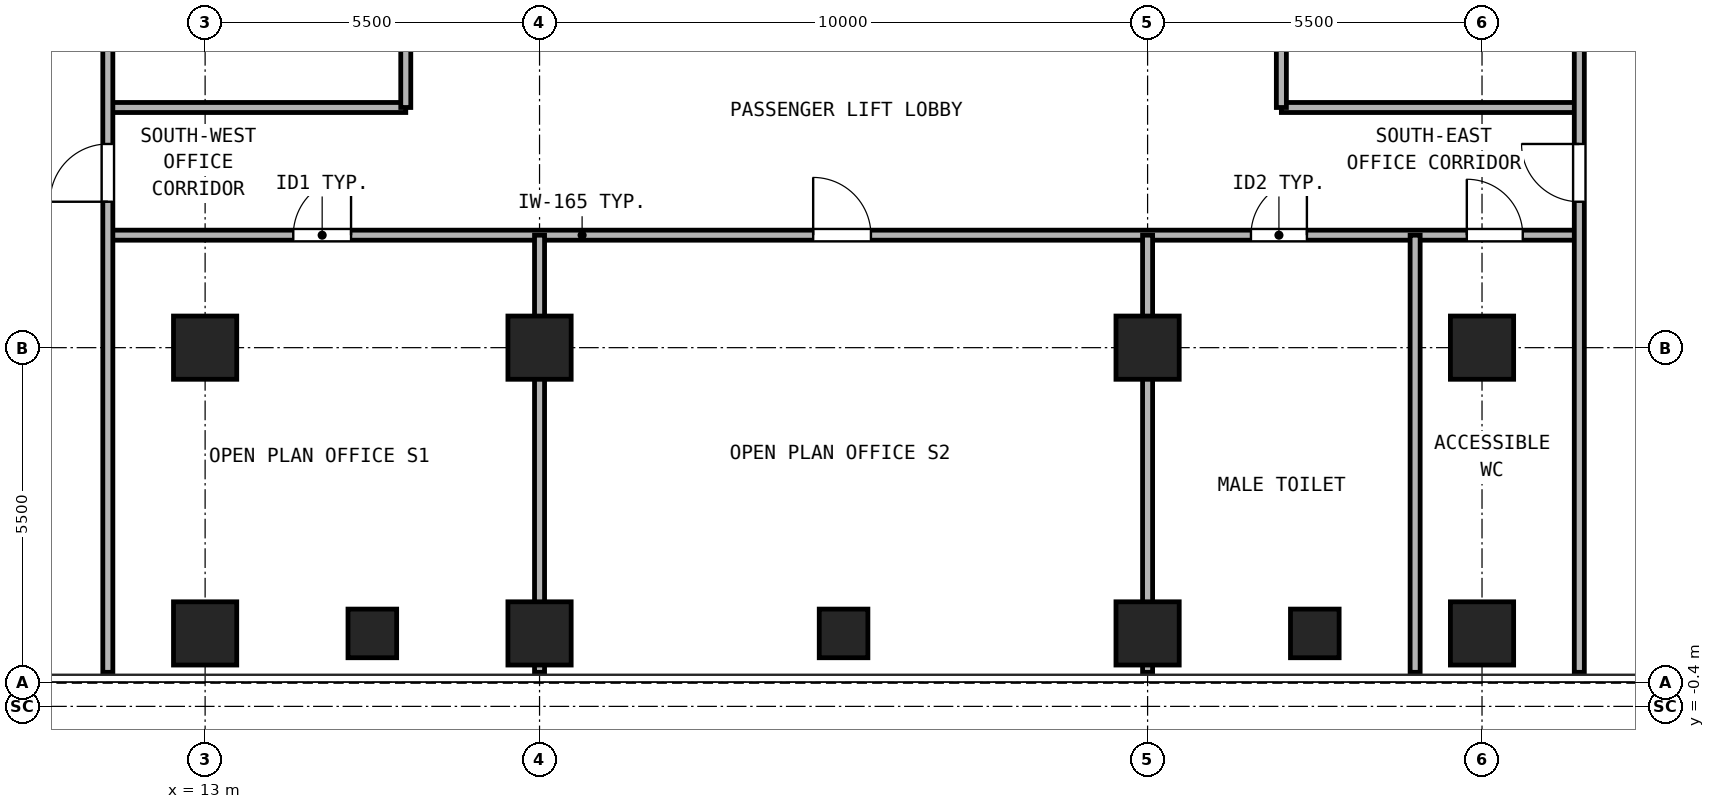
"""IFC4 building model, lengths in metres.
Left out: names, types, materials, properties, quantities, classifications, styles, units other than length and angle.
Written with IfcOpenShell. Run it as: python <this file> out.ifc"""

import sys

from ifc_helpers import new_model, si_unit, direction, frame, frame_2d, origin, origin_2d, place, context, subcontext, project, spatial, rectangle, hollow_rectangle, extrude, source, transform, mapped, element, fill, save


model = new_model("IFC4")
c1 = context("Model", 3, precision=1e-05, world=origin(), true_north=direction((0.0, 1.0)))
c2 = subcontext(c1, "Body", "Model", "MODEL_VIEW")
j1 = project(units=[si_unit("LENGTHUNIT", "METRE"), si_unit("PLANEANGLEUNIT", "RADIAN")], contexts=[c1])
p1 = place(None, origin())
s1 = spatial("IfcSite", under=j1, at=p1, CompositionType="ELEMENT")
p2 = place(p1, origin())
s2 = spatial("IfcBuilding", under=s1, at=p2, CompositionType="ELEMENT")
p3 = place(p2, frame((0.0, 0.0, 29.7)))
s3 = spatial("IfcBuildingStorey", under=s2, at=p3, CompositionType="ELEMENT", Elevation=29.7)
m1 = source(origin(), c2, "Body", "SweptSolid", [
    extrude(hollow_rectangle(XDim=1.04, YDim=1.04, WallThickness=0.065, at=origin_2d()), origin(), (0.0, 0.0, 1.0), 3.32),
])
for number, where, z_axis, x_axis in (
    (1, (13.0, 0.8, 0.0), (0.0, 0.0, 1.0), (1.0, 0.0, 0.0)),
    (2, (18.5, 0.8, 0.0), (0.0, 0.0, 1.0), (1.0, 0.0, 0.0)),
    (3, (28.5, 0.8, 0.0), (0.0, 0.0, 1.0), (1.0, 0.0, 0.0)),
    (4, (34.0, 0.8, 0.0), (0.0, 0.0, 1.0), (1.0, 0.0, 0.0)),
    (5, (13.0, 5.5, 0.0), (0.0, 0.0, 1.0), (1.0, 0.0, 0.0)),
    (6, (18.5, 5.5, 0.0), (0.0, 0.0, 1.0), (1.0, 0.0, 0.0)),
    (7, (28.5, 5.5, 0.0), (0.0, 0.0, 1.0), (1.0, 0.0, 0.0)),
    (8, (34.0, 5.5, 0.0), (0.0, 0.0, 1.0), (1.0, 0.0, 0.0)),
):
    element("IfcColumn", number, at=place(p3, frame(where, z_axis=z_axis, x_axis=x_axis)), inside=s3, PredefinedType="COLUMN", context=c2, shape_type="MappedRepresentation", body=[
        mapped(m1, transform((0.0, 0.0, 0.0), x_axis=(1.0, 0.0, 0.0), y_axis=(0.0, 1.0, 0.0), z_axis=(0.0, 0.0, 1.0), scale=1.0)),
    ])
m2 = source(origin(), c2, "Body", "SweptSolid", [
    extrude(hollow_rectangle(XDim=0.8, YDim=0.8, WallThickness=0.045, at=origin_2d()), origin(), (0.0, 0.0, 1.0), 3.32),
])
for number, where, z_axis, x_axis in (
    (9, (15.75, 0.8, 0.0), (0.0, 0.0, 1.0), (1.0, 0.0, 0.0)),
    (10, (23.5, 0.8, 0.0), (0.0, 0.0, 1.0), (1.0, 0.0, 0.0)),
    (11, (31.25, 0.8, 0.0), (0.0, 0.0, 1.0), (1.0, 0.0, 0.0)),
):
    element("IfcColumn", number, at=place(p3, frame(where, z_axis=z_axis, x_axis=x_axis)), inside=s3, PredefinedType="COLUMN", context=c2, shape_type="MappedRepresentation", body=[
        mapped(m2, transform((0.0, 0.0, 0.0), x_axis=(1.0, 0.0, 0.0), y_axis=(0.0, 1.0, 0.0), z_axis=(0.0, 0.0, 1.0), scale=1.0)),
    ])
p4 = place(p3, frame((11.4, 7.35, 0.0), z_axis=(0.0, 0.0, 1.0), x_axis=(1.0, 0.0, 0.0)))
e12 = element("IfcWall", 12, at=p4, inside=s3, PredefinedType="PARTITIONING", context=c2, shape_type="SweptSolid", body=[
    extrude(rectangle(XDim=24.2, YDim=0.165, at=frame_2d((12.1, 0.0))), origin(), (0.0, 0.0, 1.0), 3.32),
])
p5 = place(p4, frame((3.05, 0.0, 0.0)))
e13 = element("IfcOpeningElement", 13, at=p5, cuts=e12, PredefinedType="OPENING", context=c2, shape_type="SweptSolid", body=[
    extrude(rectangle(XDim=0.95, YDim=2.15, at=frame_2d((0.475, 1.075))), frame((0.0, 0.093, 0.0), z_axis=(0.0, -1.0, 0.0), x_axis=(1.0, 0.0, 0.0)), (0.0, 0.0, 1.0), 0.185),
])
p6 = place(p4, frame((11.6, 0.0, 0.0)))
e14 = element("IfcOpeningElement", 14, at=p6, cuts=e12, PredefinedType="OPENING", context=c2, shape_type="SweptSolid", body=[
    extrude(rectangle(XDim=0.95, YDim=2.15, at=frame_2d((0.475, 1.075))), frame((0.0, 0.093, 0.0), z_axis=(0.0, -1.0, 0.0), x_axis=(1.0, 0.0, 0.0)), (0.0, 0.0, 1.0), 0.185),
])
p7 = place(p4, frame((18.8, 0.0, 0.0)))
e15 = element("IfcOpeningElement", 15, at=p7, cuts=e12, PredefinedType="OPENING", context=c2, shape_type="SweptSolid", body=[
    extrude(rectangle(XDim=0.92, YDim=2.1, at=frame_2d((0.46, 1.05))), frame((0.0, 0.093, 0.0), z_axis=(0.0, -1.0, 0.0), x_axis=(1.0, 0.0, 0.0)), (0.0, 0.0, 1.0), 0.185),
])
p8 = place(p4, frame((22.35, 0.0, 0.0)))
e16 = element("IfcOpeningElement", 16, at=p8, cuts=e12, PredefinedType="OPENING", context=c2, shape_type="SweptSolid", body=[
    extrude(rectangle(XDim=0.92, YDim=2.1, at=frame_2d((0.46, 1.05))), frame((0.0, 0.093, 0.0), z_axis=(0.0, -1.0, 0.0), x_axis=(1.0, 0.0, 0.0)), (0.0, 0.0, 1.0), 0.185),
])
for number, where, z_axis, x_axis in (
    (17, (11.4, 9.45, 0.0), (0.0, 0.0, 1.0), (1.0, 0.0, 0.0)),
    (18, (30.7, 9.45, 0.0), (0.0, 0.0, 1.0), (1.0, 0.0, 0.0)),
):
    element("IfcWall", number, at=place(p3, frame(where, z_axis=z_axis, x_axis=x_axis)), inside=s3, PredefinedType="PARTITIONING", context=c2, shape_type="SweptSolid", body=[
        extrude(rectangle(XDim=4.9, YDim=0.165, at=frame_2d((2.45, 0.0))), origin(), (0.0, 0.0, 1.0), 3.32),
    ])
p9 = place(p3, frame((16.3, 9.45, 0.0), z_axis=(0.0, 0.0, 1.0), x_axis=(0.0, 1.0, 0.0)))
e19 = element("IfcWall", 19, at=p9, inside=s3, PredefinedType="PARTITIONING", context=c2, shape_type="SweptSolid", body=[
    extrude(rectangle(XDim=20.8, YDim=0.165, at=frame_2d((10.4, 0.0))), origin(), (0.0, 0.0, 1.0), 3.32),
])
p10 = place(p9, frame((6.2, 0.0, 0.0)))
e20 = element("IfcOpeningElement", 20, at=p10, cuts=e19, PredefinedType="OPENING", context=c2, shape_type="SweptSolid", body=[
    extrude(rectangle(XDim=0.95, YDim=2.15, at=frame_2d((0.475, 1.075))), frame((0.0, 0.093, 0.0), z_axis=(0.0, -1.0, 0.0), x_axis=(1.0, 0.0, 0.0)), (0.0, 0.0, 1.0), 0.185),
])
p11 = place(p9, frame((16.6, 0.0, 0.0)))
e21 = element("IfcOpeningElement", 21, at=p11, cuts=e19, PredefinedType="OPENING", context=c2, shape_type="SweptSolid", body=[
    extrude(rectangle(XDim=0.95, YDim=2.15, at=frame_2d((0.475, 1.075))), frame((0.0, 0.093, 0.0), z_axis=(0.0, -1.0, 0.0), x_axis=(1.0, 0.0, 0.0)), (0.0, 0.0, 1.0), 0.185),
])
p12 = place(p3, frame((30.7, 9.45, 0.0), z_axis=(0.0, 0.0, 1.0), x_axis=(0.0, 1.0, 0.0)))
e22 = element("IfcWall", 22, at=p12, inside=s3, PredefinedType="PARTITIONING", context=c2, shape_type="SweptSolid", body=[
    extrude(rectangle(XDim=20.8, YDim=0.165, at=frame_2d((10.4, 0.0))), origin(), (0.0, 0.0, 1.0), 3.32),
])
p13 = place(p12, frame((9.9, 0.0, 0.0)))
e23 = element("IfcOpeningElement", 23, at=p13, cuts=e22, PredefinedType="OPENING", context=c2, shape_type="SweptSolid", body=[
    extrude(rectangle(XDim=0.95, YDim=2.15, at=frame_2d((0.475, 1.075))), frame((0.0, 0.093, 0.0), z_axis=(0.0, -1.0, 0.0), x_axis=(1.0, 0.0, 0.0)), (0.0, 0.0, 1.0), 0.185),
])
p14 = place(p3, frame((11.4, 0.16, 0.0), z_axis=(0.0, 0.0, 1.0), x_axis=(0.0, 1.0, 0.0)))
e24 = element("IfcWall", 24, at=p14, inside=s3, PredefinedType="PARTITIONING", context=c2, shape_type="SweptSolid", body=[
    extrude(rectangle(XDim=40.18, YDim=0.165, at=frame_2d((20.09, 0.0))), origin(), (0.0, 0.0, 1.0), 3.32),
])
p15 = place(p14, frame((7.74, 0.0, 0.0)))
e25 = element("IfcOpeningElement", 25, at=p15, cuts=e24, PredefinedType="OPENING", context=c2, shape_type="SweptSolid", body=[
    extrude(rectangle(XDim=0.95, YDim=2.15, at=frame_2d((0.475, 1.075))), frame((0.0, 0.093, 0.0), z_axis=(0.0, -1.0, 0.0), x_axis=(1.0, 0.0, 0.0)), (0.0, 0.0, 1.0), 0.185),
])
p16 = place(p14, frame((30.64, 0.0, 0.0)))
e26 = element("IfcOpeningElement", 26, at=p16, cuts=e24, PredefinedType="OPENING", context=c2, shape_type="SweptSolid", body=[
    extrude(rectangle(XDim=0.95, YDim=2.15, at=frame_2d((0.475, 1.075))), frame((0.0, 0.093, 0.0), z_axis=(0.0, -1.0, 0.0), x_axis=(1.0, 0.0, 0.0)), (0.0, 0.0, 1.0), 0.185),
])
p17 = place(p3, frame((35.6, 0.16, 0.0), z_axis=(0.0, 0.0, 1.0), x_axis=(0.0, 1.0, 0.0)))
e27 = element("IfcWall", 27, at=p17, inside=s3, PredefinedType="PARTITIONING", context=c2, shape_type="SweptSolid", body=[
    extrude(rectangle(XDim=40.18, YDim=0.165, at=frame_2d((20.09, 0.0))), origin(), (0.0, 0.0, 1.0), 3.32),
])
p18 = place(p17, frame((7.74, 0.0, 0.0)))
e28 = element("IfcOpeningElement", 28, at=p18, cuts=e27, PredefinedType="OPENING", context=c2, shape_type="SweptSolid", body=[
    extrude(rectangle(XDim=0.95, YDim=2.15, at=frame_2d((0.475, 1.075))), frame((0.0, 0.093, 0.0), z_axis=(0.0, -1.0, 0.0), x_axis=(1.0, 0.0, 0.0)), (0.0, 0.0, 1.0), 0.185),
])
p19 = place(p17, frame((30.64, 0.0, 0.0)))
e29 = element("IfcOpeningElement", 29, at=p19, cuts=e27, PredefinedType="OPENING", context=c2, shape_type="SweptSolid", body=[
    extrude(rectangle(XDim=0.95, YDim=2.15, at=frame_2d((0.475, 1.075))), frame((0.0, 0.093, 0.0), z_axis=(0.0, -1.0, 0.0), x_axis=(1.0, 0.0, 0.0)), (0.0, 0.0, 1.0), 0.185),
])
for number, where, z_axis, x_axis in (
    (30, (18.5, 0.16, 0.0), (0.0, 0.0, 1.0), (0.0, 1.0, 0.0)),
    (31, (28.5, 0.16, 0.0), (0.0, 0.0, 1.0), (0.0, 1.0, 0.0)),
):
    element("IfcWall", number, at=place(p3, frame(where, z_axis=z_axis, x_axis=x_axis)), inside=s3, PredefinedType="PARTITIONING", context=c2, shape_type="SweptSolid", body=[
        extrude(rectangle(XDim=7.19, YDim=0.165, at=frame_2d((3.595, 0.0))), origin(), (0.0, 0.0, 1.0), 2.539),
    ])
p20 = place(p3, frame((32.9, 0.16, 0.0), z_axis=(0.0, 0.0, 1.0), x_axis=(0.0, 1.0, 0.0)))
e32 = element("IfcWall", 32, at=p20, inside=s3, PredefinedType="PARTITIONING", context=c2, shape_type="SweptSolid", body=[
    extrude(rectangle(XDim=7.19, YDim=0.165, at=frame_2d((3.595, 0.0))), origin(), (0.0, 0.0, 1.0), 3.32),
])
p21 = place(p5, frame((0.95, 0.0, 0.0), z_axis=(0.0, 0.0, 1.0), x_axis=(-1.0, 0.0, 0.0)))
e33 = element("IfcDoor", 33, at=p21, inside=s3, OperationType="SINGLE_SWING_RIGHT", PredefinedType="DOOR", context=c2, shape_type="SweptSolid", body=[
    extrude(rectangle(XDim=0.95, YDim=2.15, at=frame_2d((0.475, 1.075))), frame((0.0, 0.025, 0.0), z_axis=(0.0, -1.0, 0.0), x_axis=(1.0, 0.0, 0.0)), (0.0, 0.0, 1.0), 0.05),
])
fill(e13, e33)
p22 = place(p6, frame((0.95, 0.0, 0.0), z_axis=(0.0, 0.0, 1.0), x_axis=(-1.0, 0.0, 0.0)))
e34 = element("IfcDoor", 34, at=p22, inside=s3, OperationType="SINGLE_SWING_LEFT", PredefinedType="DOOR", context=c2, shape_type="SweptSolid", body=[
    extrude(rectangle(XDim=0.95, YDim=2.15, at=frame_2d((0.475, 1.075))), frame((0.0, 0.025, 0.0), z_axis=(0.0, -1.0, 0.0), x_axis=(1.0, 0.0, 0.0)), (0.0, 0.0, 1.0), 0.05),
])
fill(e14, e34)
p23 = place(p7, frame((0.92, 0.0, 0.0), z_axis=(0.0, 0.0, 1.0), x_axis=(-1.0, 0.0, 0.0)))
e35 = element("IfcDoor", 35, at=p23, inside=s3, OperationType="SINGLE_SWING_RIGHT", PredefinedType="DOOR", context=c2, shape_type="SweptSolid", body=[
    extrude(rectangle(XDim=0.92, YDim=2.1, at=frame_2d((0.46, 1.05))), frame((0.0, 0.025, 0.0), z_axis=(0.0, -1.0, 0.0), x_axis=(1.0, 0.0, 0.0)), (0.0, 0.0, 1.0), 0.05),
])
fill(e15, e35)
p24 = place(p8, frame((0.92, 0.0, 0.0), z_axis=(0.0, 0.0, 1.0), x_axis=(-1.0, 0.0, 0.0)))
e36 = element("IfcDoor", 36, at=p24, inside=s3, OperationType="SINGLE_SWING_LEFT", PredefinedType="DOOR", context=c2, shape_type="SweptSolid", body=[
    extrude(rectangle(XDim=0.92, YDim=2.1, at=frame_2d((0.46, 1.05))), frame((0.0, 0.025, 0.0), z_axis=(0.0, -1.0, 0.0), x_axis=(1.0, 0.0, 0.0)), (0.0, 0.0, 1.0), 0.05),
])
fill(e16, e36)
p25 = place(p15, frame((0.95, 0.0, 0.0), z_axis=(0.0, 0.0, 1.0), x_axis=(-1.0, 0.0, 0.0)))
e37 = element("IfcDoor", 37, at=p25, inside=s3, OperationType="SINGLE_SWING_LEFT", PredefinedType="DOOR", context=c2, shape_type="SweptSolid", body=[
    extrude(rectangle(XDim=0.95, YDim=2.15, at=frame_2d((0.475, 1.075))), frame((0.0, 0.025, 0.0), z_axis=(0.0, -1.0, 0.0), x_axis=(1.0, 0.0, 0.0)), (0.0, 0.0, 1.0), 0.05),
])
fill(e25, e37)
p26 = place(p18, origin())
e38 = element("IfcDoor", 38, at=p26, inside=s3, OperationType="SINGLE_SWING_RIGHT", PredefinedType="DOOR", context=c2, shape_type="SweptSolid", body=[
    extrude(rectangle(XDim=0.95, YDim=2.15, at=frame_2d((0.475, 1.075))), frame((0.0, 0.025, 0.0), z_axis=(0.0, -1.0, 0.0), x_axis=(1.0, 0.0, 0.0)), (0.0, 0.0, 1.0), 0.05),
])
fill(e28, e38)
save(model, sys.argv[1])
